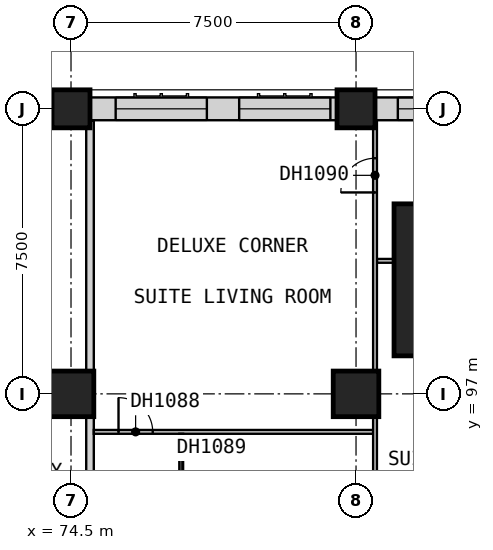
"""IFC4 building model, lengths in metres.
Left out: names, types, materials, properties, quantities, classifications, styles, units other than length and angle.
Written with IfcOpenShell. Run it as: python <this file> out.ifc"""

import sys

from ifc_helpers import new_model, si_unit, direction, frame, frame_2d, origin, origin_2d, place, context, subcontext, project, spatial, rectangle, extrude, element, fill, save


model = new_model("IFC4")
c1 = context("Model", 3, precision=1e-05, world=origin(), true_north=direction((0.0, 1.0)))
c2 = subcontext(c1, "Body", "Model", "MODEL_VIEW")
j1 = project(units=[si_unit("LENGTHUNIT", "METRE"), si_unit("PLANEANGLEUNIT", "RADIAN")], contexts=[c1])
p1 = place(None, origin())
s1 = spatial("IfcSite", under=j1, at=p1, CompositionType="ELEMENT")
p2 = place(p1, origin())
s2 = spatial("IfcBuilding", under=s1, at=p2, CompositionType="ELEMENT")
p3 = place(p2, frame((0.0, 0.0, 48.4)))
s3 = spatial("IfcBuildingStorey", under=s2, at=p3, CompositionType="ELEMENT", Elevation=48.4)
p4 = place(p3, frame((74.5, 97.0, 0.0), z_axis=(0.0, 0.0, 1.0), x_axis=(1.0, 0.0, 0.0)))
e1 = element("IfcColumn", 1, at=p4, inside=s3, PredefinedType="COLUMN", context=c2, shape_type="SweptSolid", body=[
    extrude(rectangle(XDim=1.2, YDim=1.2, at=origin_2d()), origin(), (0.0, 0.0, 1.0), 3.6),
])
p5 = place(p3, frame((74.5, 104.5, 0.0), z_axis=(0.0, 0.0, 1.0), x_axis=(1.0, 0.0, 0.0)))
e2 = element("IfcColumn", 2, at=p5, inside=s3, PredefinedType="COLUMN", context=c2, shape_type="SweptSolid", body=[
    extrude(rectangle(XDim=1.0, YDim=1.0, at=origin_2d()), origin(), (0.0, 0.0, 1.0), 3.6),
])
p6 = place(p3, frame((82.0, 97.0, 0.0), z_axis=(0.0, 0.0, 1.0), x_axis=(1.0, 0.0, 0.0)))
e3 = element("IfcColumn", 3, at=p6, inside=s3, PredefinedType="COLUMN", context=c2, shape_type="SweptSolid", body=[
    extrude(rectangle(XDim=1.2, YDim=1.2, at=origin_2d()), origin(), (0.0, 0.0, 1.0), 3.6),
])
p7 = place(p3, frame((82.0, 104.5, 0.0), z_axis=(0.0, 0.0, 1.0), x_axis=(1.0, 0.0, 0.0)))
e4 = element("IfcColumn", 4, at=p7, inside=s3, PredefinedType="COLUMN", context=c2, shape_type="SweptSolid", body=[
    extrude(rectangle(XDim=1.0, YDim=1.0, at=origin_2d()), origin(), (0.0, 0.0, 1.0), 3.6),
])
p8 = place(p3, frame((85.0, 100.0, 0.0), z_axis=(0.0, 0.0, 1.0), x_axis=(1.0, 0.0, 0.0)))
e5 = element("IfcColumn", 5, at=p8, inside=s3, PredefinedType="COLUMN", context=c2, shape_type="SweptSolid", body=[
    extrude(rectangle(XDim=4.0, YDim=4.0, at=origin_2d()), origin(), (0.0, 0.0, 1.0), 3.6),
])
p9 = place(p3, frame((87.0, 104.5, 0.0), z_axis=(0.0, 0.0, 1.0), x_axis=(-1.0, 0.0, 0.0)))
e6 = element("IfcWall", 6, at=p9, inside=s3, PredefinedType="SOLIDWALL", context=c2, shape_type="SweptSolid", body=[
    extrude(rectangle(XDim=4.5, YDim=0.6, at=frame_2d((2.25, 0.0))), origin(), (0.0, 0.0, 1.0), 3.35),
])
p10 = place(p9, frame((1.5, 0.0, 0.8)))
e7 = element("IfcOpeningElement", 7, at=p10, cuts=e6, PredefinedType="OPENING", context=c2, shape_type="SweptSolid", body=[
    extrude(rectangle(XDim=2.4, YDim=1.8, at=frame_2d((1.2, 0.9))), frame((0.0, 0.31, 0.0), z_axis=(0.0, -1.0, 0.0), x_axis=(1.0, 0.0, 0.0)), (0.0, 0.0, 1.0), 0.62),
])
p11 = place(p3, frame((81.5, 104.5, 0.0), z_axis=(0.0, 0.0, 1.0), x_axis=(-1.0, 0.0, 0.0)))
e8 = element("IfcWall", 8, at=p11, inside=s3, PredefinedType="SOLIDWALL", context=c2, shape_type="SweptSolid", body=[
    extrude(rectangle(XDim=6.5, YDim=0.6, at=frame_2d((3.25, 0.0))), origin(), (0.0, 0.0, 1.0), 2.85),
])
p12 = place(p11, frame((3.425, 0.0, 0.8)))
e9 = element("IfcOpeningElement", 9, at=p12, cuts=e8, PredefinedType="OPENING", context=c2, shape_type="SweptSolid", body=[
    extrude(rectangle(XDim=2.4, YDim=1.8, at=frame_2d((1.2, 0.9))), frame((0.0, 0.31, 0.0), z_axis=(0.0, -1.0, 0.0), x_axis=(1.0, 0.0, 0.0)), (0.0, 0.0, 1.0), 0.62),
])
p13 = place(p11, frame((0.175, 0.0, 0.8)))
e10 = element("IfcOpeningElement", 10, at=p13, cuts=e8, PredefinedType="OPENING", context=c2, shape_type="SweptSolid", body=[
    extrude(rectangle(XDim=2.4, YDim=1.8, at=frame_2d((1.2, 0.9))), frame((0.0, 0.31, 0.0), z_axis=(0.0, -1.0, 0.0), x_axis=(1.0, 0.0, 0.0)), (0.0, 0.0, 1.0), 0.62),
])
p14 = place(p3, frame((75.0, 92.475, 0.0), z_axis=(0.0, 0.0, 1.0), x_axis=(0.0, 1.0, 0.0)))
e11 = element("IfcWall", 11, at=p14, inside=s3, PredefinedType="PARTITIONING", context=c2, shape_type="SweptSolid", body=[
    extrude(rectangle(XDim=11.715, YDim=0.2, at=frame_2d((5.857, 0.0))), origin(), (0.0, 0.0, 1.0), 3.35),
])
p15 = place(p3, frame((75.1, 96.0, 0.0), z_axis=(0.0, 0.0, 1.0), x_axis=(1.0, 0.0, 0.0)))
e12 = element("IfcWall", 12, at=p15, inside=s3, PredefinedType="PARTITIONING", context=c2, shape_type="SweptSolid", body=[
    extrude(rectangle(XDim=7.35, YDim=0.1, at=frame_2d((3.675, 0.0))), origin(), (0.0, 0.0, 1.0), 3.35),
])
p16 = place(p15, frame((0.65, 0.0, 0.0)))
e13 = element("IfcOpeningElement", 13, at=p16, cuts=e12, PredefinedType="OPENING", context=c2, shape_type="SweptSolid", body=[
    extrude(rectangle(XDim=0.9, YDim=2.1, at=frame_2d((0.45, 1.05))), frame((0.0, 0.06, 0.0), z_axis=(0.0, -1.0, 0.0), x_axis=(1.0, 0.0, 0.0)), (0.0, 0.0, 1.0), 0.12),
])
p17 = place(p3, frame((72.062, 96.75, 0.0), z_axis=(0.0, 0.0, 1.0), x_axis=(1.0, 0.0, 0.0)))
e14 = element("IfcWall", 14, at=p17, inside=s3, PredefinedType="PARTITIONING", context=c2, shape_type="SweptSolid", body=[
    extrude(rectangle(XDim=2.837, YDim=0.1, at=frame_2d((1.419, 0.0))), origin(), (0.0, 0.0, 1.0), 3.35),
])
p18 = place(p17, frame((0.887, 0.0, 0.0)))
e15 = element("IfcOpeningElement", 15, at=p18, cuts=e14, PredefinedType="OPENING", context=c2, shape_type="SweptSolid", body=[
    extrude(rectangle(XDim=0.9, YDim=2.1, at=frame_2d((0.45, 1.05))), frame((0.0, 0.06, 0.0), z_axis=(0.0, -1.0, 0.0), x_axis=(1.0, 0.0, 0.0)), (0.0, 0.0, 1.0), 0.12),
])
p19 = place(p3, frame((82.55, 100.5, 0.0), z_axis=(0.0, 0.0, 1.0), x_axis=(1.0, 0.0, 0.0)))
e16 = element("IfcWall", 16, at=p19, inside=s3, PredefinedType="PARTITIONING", context=c2, shape_type="SweptSolid", body=[
    extrude(rectangle(XDim=6.64, YDim=0.1, at=frame_2d((3.32, 0.0))), origin(), (0.0, 0.0, 1.0), 3.35),
])
p20 = place(p3, frame((77.4, 92.475, 0.0), z_axis=(0.0, 0.0, 1.0), x_axis=(0.0, 1.0, 0.0)))
e17 = element("IfcWall", 17, at=p20, inside=s3, PredefinedType="PARTITIONING", context=c2, shape_type="SweptSolid", body=[
    extrude(rectangle(XDim=3.475, YDim=0.1, at=frame_2d((1.737, 0.0))), origin(), (0.0, 0.0, 1.0), 3.35),
])
p21 = place(p20, frame((1.275, 0.0, 0.0)))
e18 = element("IfcOpeningElement", 18, at=p21, cuts=e17, PredefinedType="OPENING", context=c2, shape_type="SweptSolid", body=[
    extrude(rectangle(XDim=0.9, YDim=2.1, at=frame_2d((0.45, 1.05))), frame((0.0, 0.06, 0.0), z_axis=(0.0, -1.0, 0.0), x_axis=(1.0, 0.0, 0.0)), (0.0, 0.0, 1.0), 0.12),
])
p22 = place(p3, frame((82.5, 92.462, 0.0), z_axis=(0.0, 0.0, 1.0), x_axis=(0.0, 1.0, 0.0)))
e19 = element("IfcWall", 19, at=p22, inside=s3, PredefinedType="PARTITIONING", context=c2, shape_type="SweptSolid", body=[
    extrude(rectangle(XDim=11.728, YDim=0.1, at=frame_2d((5.864, 0.0))), origin(), (0.0, 0.0, 1.0), 3.35),
])
p23 = place(p22, frame((9.837, 0.0, 0.0)))
e20 = element("IfcOpeningElement", 20, at=p23, cuts=e19, PredefinedType="OPENING", context=c2, shape_type="SweptSolid", body=[
    extrude(rectangle(XDim=0.9, YDim=2.1, at=frame_2d((0.45, 1.05))), frame((0.0, 0.06, 0.0), z_axis=(0.0, -1.0, 0.0), x_axis=(1.0, 0.0, 0.0)), (0.0, 0.0, 1.0), 0.12),
])
p24 = place(p22, frame((1.288, 0.0, 0.0)))
e21 = element("IfcOpeningElement", 21, at=p24, cuts=e19, PredefinedType="OPENING", context=c2, shape_type="SweptSolid", body=[
    extrude(rectangle(XDim=0.9, YDim=2.1, at=frame_2d((0.45, 1.05))), frame((0.0, 0.06, 0.0), z_axis=(0.0, -1.0, 0.0), x_axis=(1.0, 0.0, 0.0)), (0.0, 0.0, 1.0), 0.12),
])
p25 = place(p10, origin())
e22 = element("IfcWindow", 22, at=p25, inside=s3, PartitioningType="SINGLE_PANEL", PredefinedType="WINDOW", context=c2, shape_type="SweptSolid", body=[
    extrude(rectangle(XDim=2.4, YDim=1.8, at=frame_2d((1.2, 0.9))), frame((0.0, -0.07, 0.0), z_axis=(0.0, -1.0, 0.0), x_axis=(1.0, 0.0, 0.0)), (0.0, 0.0, 1.0), 0.06),
])
fill(e7, e22)
p26 = place(p12, origin())
e23 = element("IfcWindow", 23, at=p26, inside=s3, PartitioningType="SINGLE_PANEL", PredefinedType="WINDOW", context=c2, shape_type="SweptSolid", body=[
    extrude(rectangle(XDim=2.4, YDim=1.8, at=frame_2d((1.2, 0.9))), frame((0.0, -0.07, 0.0), z_axis=(0.0, -1.0, 0.0), x_axis=(1.0, 0.0, 0.0)), (0.0, 0.0, 1.0), 0.06),
])
fill(e9, e23)
p27 = place(p13, origin())
e24 = element("IfcWindow", 24, at=p27, inside=s3, PartitioningType="SINGLE_PANEL", PredefinedType="WINDOW", context=c2, shape_type="SweptSolid", body=[
    extrude(rectangle(XDim=2.4, YDim=1.8, at=frame_2d((1.2, 0.9))), frame((0.0, -0.07, 0.0), z_axis=(0.0, -1.0, 0.0), x_axis=(1.0, 0.0, 0.0)), (0.0, 0.0, 1.0), 0.06),
])
fill(e10, e24)
p28 = place(p16, origin())
e25 = element("IfcDoor", 25, at=p28, inside=s3, OperationType="SINGLE_SWING_LEFT", PredefinedType="DOOR", context=c2, shape_type="SweptSolid", body=[
    extrude(rectangle(XDim=0.9, YDim=2.1, at=frame_2d((0.45, 1.05))), frame((0.0, 0.025, 0.0), z_axis=(0.0, -1.0, 0.0), x_axis=(1.0, 0.0, 0.0)), (0.0, 0.0, 1.0), 0.05),
])
fill(e13, e25)
p29 = place(p23, origin())
e26 = element("IfcDoor", 26, at=p29, inside=s3, OperationType="SINGLE_SWING_LEFT", PredefinedType="DOOR", context=c2, shape_type="SweptSolid", body=[
    extrude(rectangle(XDim=0.9, YDim=2.1, at=frame_2d((0.45, 1.05))), frame((0.0, 0.025, 0.0), z_axis=(0.0, -1.0, 0.0), x_axis=(1.0, 0.0, 0.0)), (0.0, 0.0, 1.0), 0.05),
])
fill(e20, e26)
save(model, sys.argv[1])
